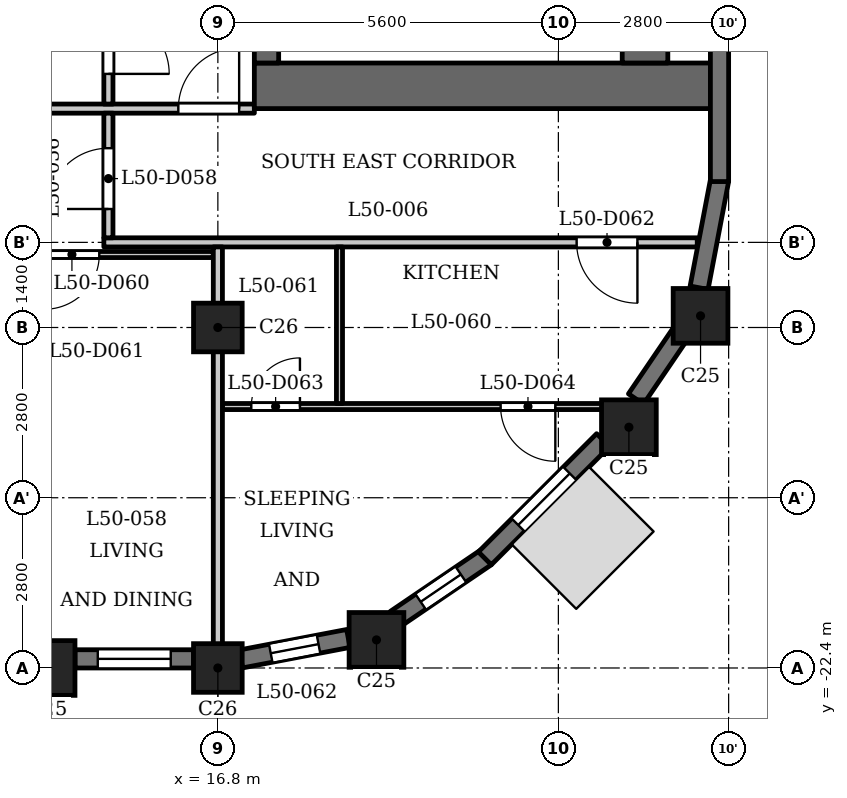
"""IFC4 building model, lengths in metres.
Left out: names, types, materials, properties, quantities, classifications, styles, units other than length and angle.
Written with IfcOpenShell. Run it as: python <this file> out.ifc"""

import sys

from ifc_helpers import new_model, si_unit, direction, frame, frame_2d, origin, origin_2d, place, context, subcontext, project, spatial, rectangle, extrude, element, fill, save


model = new_model("IFC4")
c1 = context("Model", 3, precision=1e-05, world=origin(), true_north=direction((0.0, 1.0)))
c2 = subcontext(c1, "Body", "Model", "MODEL_VIEW")
j1 = project(units=[si_unit("LENGTHUNIT", "METRE"), si_unit("PLANEANGLEUNIT", "RADIAN")], contexts=[c1])
p1 = place(None, origin())
s1 = spatial("IfcSite", under=j1, at=p1, CompositionType="ELEMENT")
p2 = place(p1, origin())
s2 = spatial("IfcBuilding", under=s1, at=p2, CompositionType="ELEMENT")
p3 = place(p2, frame((0.0, 0.0, 195.9)))
s3 = spatial("IfcBuildingStorey", under=s2, at=p3, CompositionType="ELEMENT", Elevation=195.9)
for number, where, z_axis, x_axis in (
    (1, (14.0, -22.4, 0.0), (0.0, 0.0, 1.0), (1.0, 0.0, 0.0)),
    (2, (19.409, -21.938, 0.0), (0.0, 0.0, 1.0), (1.0, 0.0, 0.0)),
    (3, (23.56, -18.44, 0.0), (0.0, 0.0, 1.0), (1.0, 0.0, 0.0)),
    (4, (24.738, -16.609, 0.0), (0.0, 0.0, 1.0), (1.0, 0.0, 0.0)),
):
    element("IfcColumn", number, at=place(p3, frame(where, z_axis=z_axis, x_axis=x_axis)), inside=s3, PredefinedType="COLUMN", context=c2, shape_type="SweptSolid", body=[
        extrude(rectangle(XDim=0.9, YDim=0.9, at=origin_2d()), origin(), (0.0, 0.0, 1.0), 3.5),
    ])
for number, where, z_axis, x_axis in (
    (5, (16.8, -22.4, 0.0), (0.0, 0.0, 1.0), (1.0, 0.0, 0.0)),
    (6, (16.8, -16.8, 0.0), (0.0, 0.0, 1.0), (1.0, 0.0, 0.0)),
):
    element("IfcColumn", number, at=place(p3, frame(where, z_axis=z_axis, x_axis=x_axis)), inside=s3, PredefinedType="COLUMN", context=c2, shape_type="SweptSolid", body=[
        extrude(rectangle(XDim=0.8, YDim=0.8, at=origin_2d()), origin(), (0.0, 0.0, 1.0), 3.5),
    ])
p4 = place(p3, frame((14.45, -22.25, 0.0), z_axis=(0.0, 0.0, 1.0), x_axis=(1.0, 0.0, 0.0)))
e7 = element("IfcWall", 7, at=p4, inside=s3, PredefinedType="SOLIDWALL", context=c2, shape_type="SweptSolid", body=[
    extrude(rectangle(XDim=1.95, YDim=0.3, at=frame_2d((0.975, 0.0))), origin(), (0.0, 0.0, 1.0), 2.5),
])
p5 = place(p4, frame((0.375, 0.0, 0.6)))
e8 = element("IfcOpeningElement", 8, at=p5, cuts=e7, PredefinedType="OPENING", context=c2, shape_type="SweptSolid", body=[
    extrude(rectangle(XDim=1.2, YDim=1.55, at=frame_2d((0.6, 0.775))), frame((0.0, 0.16, 0.0), z_axis=(0.0, -1.0, 0.0), x_axis=(1.0, 0.0, 0.0)), (0.0, 0.0, 1.0), 0.32),
])
p6 = place(p3, frame((17.179, -22.251, 0.0), z_axis=(0.0, 0.0, 1.0), x_axis=(0.98230529033, 0.187286722942, 0.0)))
e9 = element("IfcWall", 9, at=p6, inside=s3, PredefinedType="SOLIDWALL", context=c2, shape_type="SweptSolid", body=[
    extrude(rectangle(XDim=1.799, YDim=0.3, at=frame_2d((0.899, 0.0))), origin(), (0.0, 0.0, 1.0), 2.5),
])
p7 = place(p6, frame((0.5, 0.0, 0.6)))
e10 = element("IfcOpeningElement", 10, at=p7, cuts=e9, PredefinedType="OPENING", context=c2, shape_type="SweptSolid", body=[
    extrude(rectangle(XDim=0.8, YDim=1.55, at=frame_2d((0.4, 0.775))), frame((0.0, 0.16, 0.0), z_axis=(0.0, -1.0, 0.0), x_axis=(1.0, 0.0, 0.0)), (0.0, 0.0, 1.0), 0.32),
])
p8 = place(p3, frame((19.719, -21.594, 0.0), z_axis=(0.0, 0.0, 1.0), x_axis=(0.827067282455, 0.562102935673, 0.0)))
e11 = element("IfcWall", 11, at=p8, inside=s3, PredefinedType="SOLIDWALL", context=c2, shape_type="SweptSolid", body=[
    extrude(rectangle(XDim=1.806, YDim=0.3, at=frame_2d((0.903, 0.0))), origin(), (0.0, 0.0, 1.0), 2.5),
])
p9 = place(p8, frame((0.503, 0.0, 0.6)))
e12 = element("IfcOpeningElement", 12, at=p9, cuts=e11, PredefinedType="OPENING", context=c2, shape_type="SweptSolid", body=[
    extrude(rectangle(XDim=0.8, YDim=1.55, at=frame_2d((0.4, 0.775))), frame((0.0, 0.16, 0.0), z_axis=(0.0, -1.0, 0.0), x_axis=(1.0, 0.0, 0.0)), (0.0, 0.0, 1.0), 0.32),
])
p10 = place(p3, frame((21.191, -20.597, 0.0), z_axis=(0.0, 0.0, 1.0), x_axis=(0.707106781187, 0.707106781187, 0.0)))
e13 = element("IfcWall", 13, at=p10, inside=s3, PredefinedType="SOLIDWALL", context=c2, shape_type="SweptSolid", body=[
    extrude(rectangle(XDim=2.75, YDim=0.3, at=frame_2d((1.375, 0.0))), origin(), (0.0, 0.0, 1.0), 2.5),
])
p11 = place(p10, frame((0.775, 0.0, 0.6)))
e14 = element("IfcOpeningElement", 14, at=p11, cuts=e13, PredefinedType="OPENING", context=c2, shape_type="SweptSolid", body=[
    extrude(rectangle(XDim=1.2, YDim=1.55, at=frame_2d((0.6, 0.775))), frame((0.0, 0.16, 0.0), z_axis=(0.0, -1.0, 0.0), x_axis=(1.0, 0.0, 0.0)), (0.0, 0.0, 1.0), 0.32),
])
p12 = place(p3, frame((23.676, -17.975, 0.0), z_axis=(0.0, 0.0, 1.0), x_axis=(0.56200149592, 0.827136215253, 0.0)))
e15 = element("IfcWall", 15, at=p12, inside=s3, PredefinedType="SOLIDWALL", context=c2, shape_type="SweptSolid", body=[
    extrude(rectangle(XDim=1.277, YDim=0.3, at=frame_2d((0.639, 0.0))), origin(), (0.0, 0.0, 1.0), 2.5),
])
p13 = place(p3, frame((24.714, -16.146, 0.0), z_axis=(0.0, 0.0, 1.0), x_axis=(0.187348135549, 0.982293579388, 0.0)))
e16 = element("IfcWall", 16, at=p13, inside=s3, PredefinedType="SOLIDWALL", context=c2, shape_type="SweptSolid", body=[
    extrude(rectangle(XDim=1.806, YDim=0.3, at=frame_2d((0.903, 0.0))), origin(), (0.0, 0.0, 1.0), 2.5),
])
p14 = place(p3, frame((25.05, -14.4, 0.0), z_axis=(0.0, 0.0, 1.0), x_axis=(0.0, 1.0, 0.0)))
e17 = element("IfcWall", 17, at=p14, inside=s3, PredefinedType="SOLIDWALL", context=c2, shape_type="SweptSolid", body=[
    extrude(rectangle(XDim=2.75, YDim=0.3, at=frame_2d((1.375, 0.0))), origin(), (0.0, 0.0, 1.0), 2.5),
])
p15 = place(p3, frame((17.4, -12.825, 0.0), z_axis=(0.0, 0.0, 1.0), x_axis=(1.0, 0.0, 0.0)))
e18 = element("IfcWall", 18, at=p15, inside=s3, PredefinedType="SHEAR", context=c2, shape_type="SweptSolid", body=[
    extrude(rectangle(XDim=7.6, YDim=0.75, at=frame_2d((3.8, 0.0))), origin(), (0.0, 0.0, 1.0), 3.2),
])
p16 = place(p3, frame((17.6, -12.45, 0.0), z_axis=(0.0, 0.0, 1.0), x_axis=(0.0, 1.0, 0.0)))
e19 = element("IfcWall", 19, at=p16, inside=s3, PredefinedType="SHEAR", context=c2, shape_type="SweptSolid", body=[
    extrude(rectangle(XDim=24.9, YDim=0.4, at=frame_2d((12.45, 0.0))), origin(), (0.0, 0.0, 1.0), 3.2),
])
p17 = place(p16, frame((6.325, 0.0, 0.0)))
e20 = element("IfcOpeningElement", 20, at=p17, cuts=e19, PredefinedType="OPENING", context=c2, shape_type="SweptSolid", body=[
    extrude(rectangle(XDim=0.9, YDim=2.1, at=frame_2d((0.45, 1.05))), frame((0.0, 0.21, 0.0), z_axis=(0.0, -1.0, 0.0), x_axis=(1.0, 0.0, 0.0)), (0.0, 0.0, 1.0), 0.42),
])
p18 = place(p16, frame((9.925, 0.0, 0.0)))
e21 = element("IfcOpeningElement", 21, at=p18, cuts=e19, PredefinedType="OPENING", context=c2, shape_type="SweptSolid", body=[
    extrude(rectangle(XDim=0.9, YDim=2.1, at=frame_2d((0.45, 1.05))), frame((0.0, 0.21, 0.0), z_axis=(0.0, -1.0, 0.0), x_axis=(1.0, 0.0, 0.0)), (0.0, 0.0, 1.0), 0.42),
])
p19 = place(p16, frame((15.6, 0.0, 0.0)))
e22 = element("IfcOpeningElement", 22, at=p19, cuts=e19, PredefinedType="OPENING", context=c2, shape_type="SweptSolid", body=[
    extrude(rectangle(XDim=1.1, YDim=2.1, at=frame_2d((0.55, 1.05))), frame((0.0, 0.21, 0.0), z_axis=(0.0, -1.0, 0.0), x_axis=(1.0, 0.0, 0.0)), (0.0, 0.0, 1.0), 0.42),
])
p20 = place(p16, frame((18.0, 0.0, 0.0)))
e23 = element("IfcOpeningElement", 23, at=p20, cuts=e19, PredefinedType="OPENING", context=c2, shape_type="SweptSolid", body=[
    extrude(rectangle(XDim=1.1, YDim=2.1, at=frame_2d((0.55, 1.05))), frame((0.0, 0.21, 0.0), z_axis=(0.0, -1.0, 0.0), x_axis=(1.0, 0.0, 0.0)), (0.0, 0.0, 1.0), 0.42),
])
p21 = place(p16, frame((23.025, 0.0, 0.0)))
e24 = element("IfcOpeningElement", 24, at=p21, cuts=e19, PredefinedType="OPENING", context=c2, shape_type="SweptSolid", body=[
    extrude(rectangle(XDim=1.1, YDim=2.1, at=frame_2d((0.55, 1.05))), frame((0.0, 0.21, 0.0), z_axis=(0.0, -1.0, 0.0), x_axis=(1.0, 0.0, 0.0)), (0.0, 0.0, 1.0), 0.42),
])
p22 = place(p16, frame((0.775, 0.0, 0.0)))
e25 = element("IfcOpeningElement", 25, at=p22, cuts=e19, PredefinedType="OPENING", context=c2, shape_type="SweptSolid", body=[
    extrude(rectangle(XDim=1.1, YDim=2.1, at=frame_2d((0.55, 1.05))), frame((0.0, 0.21, 0.0), z_axis=(0.0, -1.0, 0.0), x_axis=(1.0, 0.0, 0.0)), (0.0, 0.0, 1.0), 0.42),
])
p23 = place(p16, frame((12.925, 0.0, 0.0)))
e26 = element("IfcOpeningElement", 26, at=p23, cuts=e19, PredefinedType="OPENING", context=c2, shape_type="SweptSolid", body=[
    extrude(rectangle(XDim=1.8, YDim=2.1, at=frame_2d((0.9, 1.05))), frame((0.0, 0.21, 0.0), z_axis=(0.0, -1.0, 0.0), x_axis=(1.0, 0.0, 0.0)), (0.0, 0.0, 1.0), 0.42),
])
p24 = place(p3, frame((23.825, -12.45, 0.0), z_axis=(0.0, 0.0, 1.0), x_axis=(0.0, 1.0, 0.0)))
e27 = element("IfcWall", 27, at=p24, inside=s3, PredefinedType="SHEAR", context=c2, shape_type="SweptSolid", body=[
    extrude(rectangle(XDim=24.9, YDim=0.75, at=frame_2d((12.45, 0.0))), origin(), (0.0, 0.0, 1.0), 3.2),
])
p25 = place(p3, frame((16.875, -18.1, 0.0), z_axis=(0.0, 0.0, 1.0), x_axis=(1.0, 0.0, 0.0)))
e28 = element("IfcWall", 28, at=p25, inside=s3, PredefinedType="PARTITIONING", context=c2, shape_type="SweptSolid", body=[
    extrude(rectangle(XDim=6.765, YDim=0.1, at=frame_2d((3.382, 0.0))), origin(), (0.0, 0.0, 1.0), 3.2),
])
p26 = place(p25, frame((0.475, 0.0, 0.0)))
e29 = element("IfcOpeningElement", 29, at=p26, cuts=e28, PredefinedType="OPENING", context=c2, shape_type="SweptSolid", body=[
    extrude(rectangle(XDim=0.8, YDim=2.1, at=frame_2d((0.4, 1.05))), frame((0.0, 0.06, 0.0), z_axis=(0.0, -1.0, 0.0), x_axis=(1.0, 0.0, 0.0)), (0.0, 0.0, 1.0), 0.12),
])
p27 = place(p25, frame((4.575, 0.0, 0.0)))
e30 = element("IfcOpeningElement", 30, at=p27, cuts=e28, PredefinedType="OPENING", context=c2, shape_type="SweptSolid", body=[
    extrude(rectangle(XDim=0.9, YDim=2.1, at=frame_2d((0.45, 1.05))), frame((0.0, 0.06, 0.0), z_axis=(0.0, -1.0, 0.0), x_axis=(1.0, 0.0, 0.0)), (0.0, 0.0, 1.0), 0.12),
])
p28 = place(p3, frame((-16.725, -15.6, 0.0), z_axis=(0.0, 0.0, 1.0), x_axis=(1.0, 0.0, 0.0)))
e31 = element("IfcWall", 31, at=p28, inside=s3, PredefinedType="PARTITIONING", context=c2, shape_type="SweptSolid", body=[
    extrude(rectangle(XDim=33.45, YDim=0.1, at=frame_2d((16.725, 0.0))), origin(), (0.0, 0.0, 1.0), 3.2),
])
p29 = place(p28, frame((4.075, 0.0, 0.0)))
e32 = element("IfcOpeningElement", 32, at=p29, cuts=e31, PredefinedType="OPENING", context=c2, shape_type="SweptSolid", body=[
    extrude(rectangle(XDim=0.8, YDim=2.1, at=frame_2d((0.4, 1.05))), frame((0.0, 0.06, 0.0), z_axis=(0.0, -1.0, 0.0), x_axis=(1.0, 0.0, 0.0)), (0.0, 0.0, 1.0), 0.12),
])
p30 = place(p28, frame((1.825, 0.0, 0.0)))
e33 = element("IfcOpeningElement", 33, at=p30, cuts=e31, PredefinedType="OPENING", context=c2, shape_type="SweptSolid", body=[
    extrude(rectangle(XDim=0.9, YDim=2.1, at=frame_2d((0.45, 1.05))), frame((0.0, 0.06, 0.0), z_axis=(0.0, -1.0, 0.0), x_axis=(1.0, 0.0, 0.0)), (0.0, 0.0, 1.0), 0.12),
])
p31 = place(p28, frame((9.675, 0.0, 0.0)))
e34 = element("IfcOpeningElement", 34, at=p31, cuts=e31, PredefinedType="OPENING", context=c2, shape_type="SweptSolid", body=[
    extrude(rectangle(XDim=0.8, YDim=2.1, at=frame_2d((0.4, 1.05))), frame((0.0, 0.06, 0.0), z_axis=(0.0, -1.0, 0.0), x_axis=(1.0, 0.0, 0.0)), (0.0, 0.0, 1.0), 0.12),
])
p32 = place(p28, frame((14.025, 0.0, 0.0)))
e35 = element("IfcOpeningElement", 35, at=p32, cuts=e31, PredefinedType="OPENING", context=c2, shape_type="SweptSolid", body=[
    extrude(rectangle(XDim=0.9, YDim=2.1, at=frame_2d((0.45, 1.05))), frame((0.0, 0.06, 0.0), z_axis=(0.0, -1.0, 0.0), x_axis=(1.0, 0.0, 0.0)), (0.0, 0.0, 1.0), 0.12),
])
p33 = place(p28, frame((20.875, 0.0, 0.0)))
e36 = element("IfcOpeningElement", 36, at=p33, cuts=e31, PredefinedType="OPENING", context=c2, shape_type="SweptSolid", body=[
    extrude(rectangle(XDim=0.8, YDim=2.1, at=frame_2d((0.4, 1.05))), frame((0.0, 0.06, 0.0), z_axis=(0.0, -1.0, 0.0), x_axis=(1.0, 0.0, 0.0)), (0.0, 0.0, 1.0), 0.12),
])
p34 = place(p28, frame((25.225, 0.0, 0.0)))
e37 = element("IfcOpeningElement", 37, at=p34, cuts=e31, PredefinedType="OPENING", context=c2, shape_type="SweptSolid", body=[
    extrude(rectangle(XDim=0.9, YDim=2.1, at=frame_2d((0.45, 1.05))), frame((0.0, 0.06, 0.0), z_axis=(0.0, -1.0, 0.0), x_axis=(1.0, 0.0, 0.0)), (0.0, 0.0, 1.0), 0.12),
])
p35 = place(p28, frame((28.475, 0.0, 0.0)))
e38 = element("IfcOpeningElement", 38, at=p35, cuts=e31, PredefinedType="OPENING", context=c2, shape_type="SweptSolid", body=[
    extrude(rectangle(XDim=0.8, YDim=2.1, at=frame_2d((0.4, 1.05))), frame((0.0, 0.06, 0.0), z_axis=(0.0, -1.0, 0.0), x_axis=(1.0, 0.0, 0.0)), (0.0, 0.0, 1.0), 0.12),
])
p36 = place(p28, frame((30.675, 0.0, 0.0)))
e39 = element("IfcOpeningElement", 39, at=p36, cuts=e31, PredefinedType="OPENING", context=c2, shape_type="SweptSolid", body=[
    extrude(rectangle(XDim=0.9, YDim=2.1, at=frame_2d((0.45, 1.05))), frame((0.0, 0.06, 0.0), z_axis=(0.0, -1.0, 0.0), x_axis=(1.0, 0.0, 0.0)), (0.0, 0.0, 1.0), 0.12),
])
p37 = place(p3, frame((14.925, -15.4, 0.0), z_axis=(0.0, 0.0, 1.0), x_axis=(1.0, 0.0, 0.0)))
e40 = element("IfcWall", 40, at=p37, inside=s3, PredefinedType="PARTITIONING", context=c2, shape_type="SweptSolid", body=[
    extrude(rectangle(XDim=9.759, YDim=0.15, at=frame_2d((4.879, 0.0))), origin(), (0.0, 0.0, 1.0), 3.2),
])
p38 = place(p37, frame((7.775, 0.0, 0.0)))
e41 = element("IfcOpeningElement", 41, at=p38, cuts=e40, PredefinedType="OPENING", context=c2, shape_type="SweptSolid", body=[
    extrude(rectangle(XDim=1.0, YDim=2.1, at=frame_2d((0.5, 1.05))), frame((0.0, 0.085, 0.0), z_axis=(0.0, -1.0, 0.0), x_axis=(1.0, 0.0, 0.0)), (0.0, 0.0, 1.0), 0.17),
])
p39 = place(p3, frame((-17.4, -13.2, 0.0), z_axis=(0.0, 0.0, 1.0), x_axis=(1.0, 0.0, 0.0)))
e42 = element("IfcWall", 42, at=p39, inside=s3, PredefinedType="PARTITIONING", context=c2, shape_type="SweptSolid", body=[
    extrude(rectangle(XDim=34.8, YDim=0.15, at=frame_2d((17.4, 0.0))), origin(), (0.0, 0.0, 1.0), 3.2),
])
p40 = place(p39, frame((0.15, 0.0, 0.0)))
e43 = element("IfcOpeningElement", 43, at=p40, cuts=e42, PredefinedType="OPENING", context=c2, shape_type="SweptSolid", body=[
    extrude(rectangle(XDim=1.0, YDim=2.1, at=frame_2d((0.5, 1.05))), frame((0.0, 0.085, 0.0), z_axis=(0.0, -1.0, 0.0), x_axis=(1.0, 0.0, 0.0)), (0.0, 0.0, 1.0), 0.17),
])
p41 = place(p39, frame((33.55, 0.0, 0.0)))
e44 = element("IfcOpeningElement", 44, at=p41, cuts=e42, PredefinedType="OPENING", context=c2, shape_type="SweptSolid", body=[
    extrude(rectangle(XDim=1.0, YDim=2.1, at=frame_2d((0.5, 1.05))), frame((0.0, 0.085, 0.0), z_axis=(0.0, -1.0, 0.0), x_axis=(1.0, 0.0, 0.0)), (0.0, 0.0, 1.0), 0.17),
])
p42 = place(p39, frame((15.7, 0.0, 0.0)))
e45 = element("IfcOpeningElement", 45, at=p42, cuts=e42, PredefinedType="OPENING", context=c2, shape_type="SweptSolid", body=[
    extrude(rectangle(XDim=1.0, YDim=2.1, at=frame_2d((0.5, 1.05))), frame((0.0, 0.085, 0.0), z_axis=(0.0, -1.0, 0.0), x_axis=(1.0, 0.0, 0.0)), (0.0, 0.0, 1.0), 0.17),
])
p43 = place(p39, frame((26.9, 0.0, 0.0)))
e46 = element("IfcOpeningElement", 46, at=p43, cuts=e42, PredefinedType="OPENING", context=c2, shape_type="SweptSolid", body=[
    extrude(rectangle(XDim=1.0, YDim=2.1, at=frame_2d((0.5, 1.05))), frame((0.0, 0.085, 0.0), z_axis=(0.0, -1.0, 0.0), x_axis=(1.0, 0.0, 0.0)), (0.0, 0.0, 1.0), 0.17),
])
p44 = place(p3, frame((15.0, -15.325, 0.0), z_axis=(0.0, 0.0, 1.0), x_axis=(0.0, 1.0, 0.0)))
e47 = element("IfcWall", 47, at=p44, inside=s3, PredefinedType="PARTITIONING", context=c2, shape_type="SweptSolid", body=[
    extrude(rectangle(XDim=2.05, YDim=0.15, at=frame_2d((1.025, 0.0))), origin(), (0.0, 0.0, 1.0), 3.2),
])
p45 = place(p44, frame((0.474, 0.0, 0.0)))
e48 = element("IfcOpeningElement", 48, at=p45, cuts=e47, PredefinedType="OPENING", context=c2, shape_type="SweptSolid", body=[
    extrude(rectangle(XDim=1.0, YDim=2.1, at=frame_2d((0.5, 1.05))), frame((0.0, 0.085, 0.0), z_axis=(0.0, -1.0, 0.0), x_axis=(1.0, 0.0, 0.0)), (0.0, 0.0, 1.0), 0.17),
])
p46 = place(p3, frame((15.0, -13.125, 0.0), z_axis=(0.0, 0.0, 1.0), x_axis=(0.0, 1.0, 0.0)))
e49 = element("IfcWall", 49, at=p46, inside=s3, PredefinedType="PARTITIONING", context=c2, shape_type="SweptSolid", body=[
    extrude(rectangle(XDim=6.356, YDim=0.15, at=frame_2d((3.178, 0.0))), origin(), (0.0, 0.0, 1.0), 3.2),
])
p47 = place(p46, frame((0.496, 0.0, 0.0)))
e50 = element("IfcOpeningElement", 50, at=p47, cuts=e49, PredefinedType="OPENING", context=c2, shape_type="SweptSolid", body=[
    extrude(rectangle(XDim=1.0, YDim=2.1, at=frame_2d((0.5, 1.05))), frame((0.0, 0.085, 0.0), z_axis=(0.0, -1.0, 0.0), x_axis=(1.0, 0.0, 0.0)), (0.0, 0.0, 1.0), 0.17),
])
p48 = place(p3, frame((16.8, -22.31, 0.0), z_axis=(0.0, 0.0, 1.0), x_axis=(0.0, 1.0, 0.0)))
e51 = element("IfcWall", 51, at=p48, inside=s3, PredefinedType="PARTITIONING", context=c2, shape_type="SweptSolid", body=[
    extrude(rectangle(XDim=6.835, YDim=0.15, at=frame_2d((3.417, 0.0))), origin(), (0.0, 0.0, 1.0), 2.55),
])
p49 = place(p3, frame((18.8, -18.05, 0.0), z_axis=(0.0, 0.0, 1.0), x_axis=(0.0, 1.0, 0.0)))
e52 = element("IfcWall", 52, at=p49, inside=s3, PredefinedType="PARTITIONING", context=c2, shape_type="SweptSolid", body=[
    extrude(rectangle(XDim=2.575, YDim=0.1, at=frame_2d((1.288, 0.0))), origin(), (0.0, 0.0, 1.0), 3.2),
])
p50 = place(p47, origin())
e53 = element("IfcDoor", 53, at=p50, inside=s3, OperationType="SINGLE_SWING_LEFT", PredefinedType="DOOR", context=c2, shape_type="SweptSolid", body=[
    extrude(rectangle(XDim=1.0, YDim=2.1, at=frame_2d((0.5, 1.05))), frame((0.0, 0.025, 0.0), z_axis=(0.0, -1.0, 0.0), x_axis=(1.0, 0.0, 0.0)), (0.0, 0.0, 1.0), 0.05),
])
fill(e50, e53)
p51 = place(p41, origin())
e54 = element("IfcDoor", 54, at=p51, inside=s3, OperationType="SINGLE_SWING_LEFT", PredefinedType="DOOR", context=c2, shape_type="SweptSolid", body=[
    extrude(rectangle(XDim=1.0, YDim=2.1, at=frame_2d((0.5, 1.05))), frame((0.0, 0.025, 0.0), z_axis=(0.0, -1.0, 0.0), x_axis=(1.0, 0.0, 0.0)), (0.0, 0.0, 1.0), 0.05),
])
fill(e44, e54)
p52 = place(p45, origin())
e55 = element("IfcDoor", 55, at=p52, inside=s3, OperationType="SINGLE_SWING_RIGHT", PredefinedType="DOOR", context=c2, shape_type="SweptSolid", body=[
    extrude(rectangle(XDim=1.0, YDim=2.1, at=frame_2d((0.5, 1.05))), frame((0.0, 0.025, 0.0), z_axis=(0.0, -1.0, 0.0), x_axis=(1.0, 0.0, 0.0)), (0.0, 0.0, 1.0), 0.05),
])
fill(e48, e55)
p53 = place(p36, origin())
e56 = element("IfcDoor", 56, at=p53, inside=s3, OperationType="SINGLE_SWING_LEFT", PredefinedType="DOOR", context=c2, shape_type="SweptSolid", body=[
    extrude(rectangle(XDim=0.9, YDim=2.1, at=frame_2d((0.45, 1.05))), frame((0.0, 0.025, 0.0), z_axis=(0.0, -1.0, 0.0), x_axis=(1.0, 0.0, 0.0)), (0.0, 0.0, 1.0), 0.05),
])
fill(e39, e56)
p54 = place(p38, origin())
e57 = element("IfcDoor", 57, at=p54, inside=s3, OperationType="SINGLE_SWING_RIGHT", PredefinedType="DOOR", context=c2, shape_type="SweptSolid", body=[
    extrude(rectangle(XDim=1.0, YDim=2.1, at=frame_2d((0.5, 1.05))), frame((0.0, 0.025, 0.0), z_axis=(0.0, -1.0, 0.0), x_axis=(1.0, 0.0, 0.0)), (0.0, 0.0, 1.0), 0.05),
])
fill(e41, e57)
p55 = place(p26, origin())
e58 = element("IfcDoor", 58, at=p55, inside=s3, OperationType="SINGLE_SWING_LEFT", PredefinedType="DOOR", context=c2, shape_type="SweptSolid", body=[
    extrude(rectangle(XDim=0.8, YDim=2.1, at=frame_2d((0.4, 1.05))), frame((0.0, 0.025, 0.0), z_axis=(0.0, -1.0, 0.0), x_axis=(1.0, 0.0, 0.0)), (0.0, 0.0, 1.0), 0.05),
])
fill(e29, e58)
p56 = place(p27, origin())
e59 = element("IfcDoor", 59, at=p56, inside=s3, OperationType="SINGLE_SWING_RIGHT", PredefinedType="DOOR", context=c2, shape_type="SweptSolid", body=[
    extrude(rectangle(XDim=0.9, YDim=2.1, at=frame_2d((0.45, 1.05))), frame((0.0, 0.025, 0.0), z_axis=(0.0, -1.0, 0.0), x_axis=(1.0, 0.0, 0.0)), (0.0, 0.0, 1.0), 0.05),
])
fill(e30, e59)
p57 = place(p5, origin())
e60 = element("IfcWindow", 60, at=p57, inside=s3, PartitioningType="SINGLE_PANEL", PredefinedType="WINDOW", context=c2, shape_type="SweptSolid", body=[
    extrude(rectangle(XDim=1.2, YDim=1.55, at=frame_2d((0.6, 0.775))), frame((0.0, 0.03, 0.0), z_axis=(0.0, -1.0, 0.0), x_axis=(1.0, 0.0, 0.0)), (0.0, 0.0, 1.0), 0.06),
])
fill(e8, e60)
p58 = place(p7, origin())
e61 = element("IfcWindow", 61, at=p58, inside=s3, PartitioningType="SINGLE_PANEL", PredefinedType="WINDOW", context=c2, shape_type="SweptSolid", body=[
    extrude(rectangle(XDim=0.8, YDim=1.55, at=frame_2d((0.4, 0.775))), frame((0.0, 0.03, 0.0), z_axis=(0.0, -1.0, 0.0), x_axis=(1.0, 0.0, 0.0)), (0.0, 0.0, 1.0), 0.06),
])
fill(e10, e61)
p59 = place(p9, origin())
e62 = element("IfcWindow", 62, at=p59, inside=s3, PartitioningType="SINGLE_PANEL", PredefinedType="WINDOW", context=c2, shape_type="SweptSolid", body=[
    extrude(rectangle(XDim=0.8, YDim=1.55, at=frame_2d((0.4, 0.775))), frame((0.0, 0.03, 0.0), z_axis=(0.0, -1.0, 0.0), x_axis=(1.0, 0.0, 0.0)), (0.0, 0.0, 1.0), 0.06),
])
fill(e12, e62)
p60 = place(p11, origin())
e63 = element("IfcWindow", 63, at=p60, inside=s3, PartitioningType="SINGLE_PANEL", PredefinedType="WINDOW", context=c2, shape_type="SweptSolid", body=[
    extrude(rectangle(XDim=1.2, YDim=1.55, at=frame_2d((0.6, 0.775))), frame((0.0, 0.03, 0.0), z_axis=(0.0, -1.0, 0.0), x_axis=(1.0, 0.0, 0.0)), (0.0, 0.0, 1.0), 0.06),
])
fill(e14, e63)
save(model, sys.argv[1])
